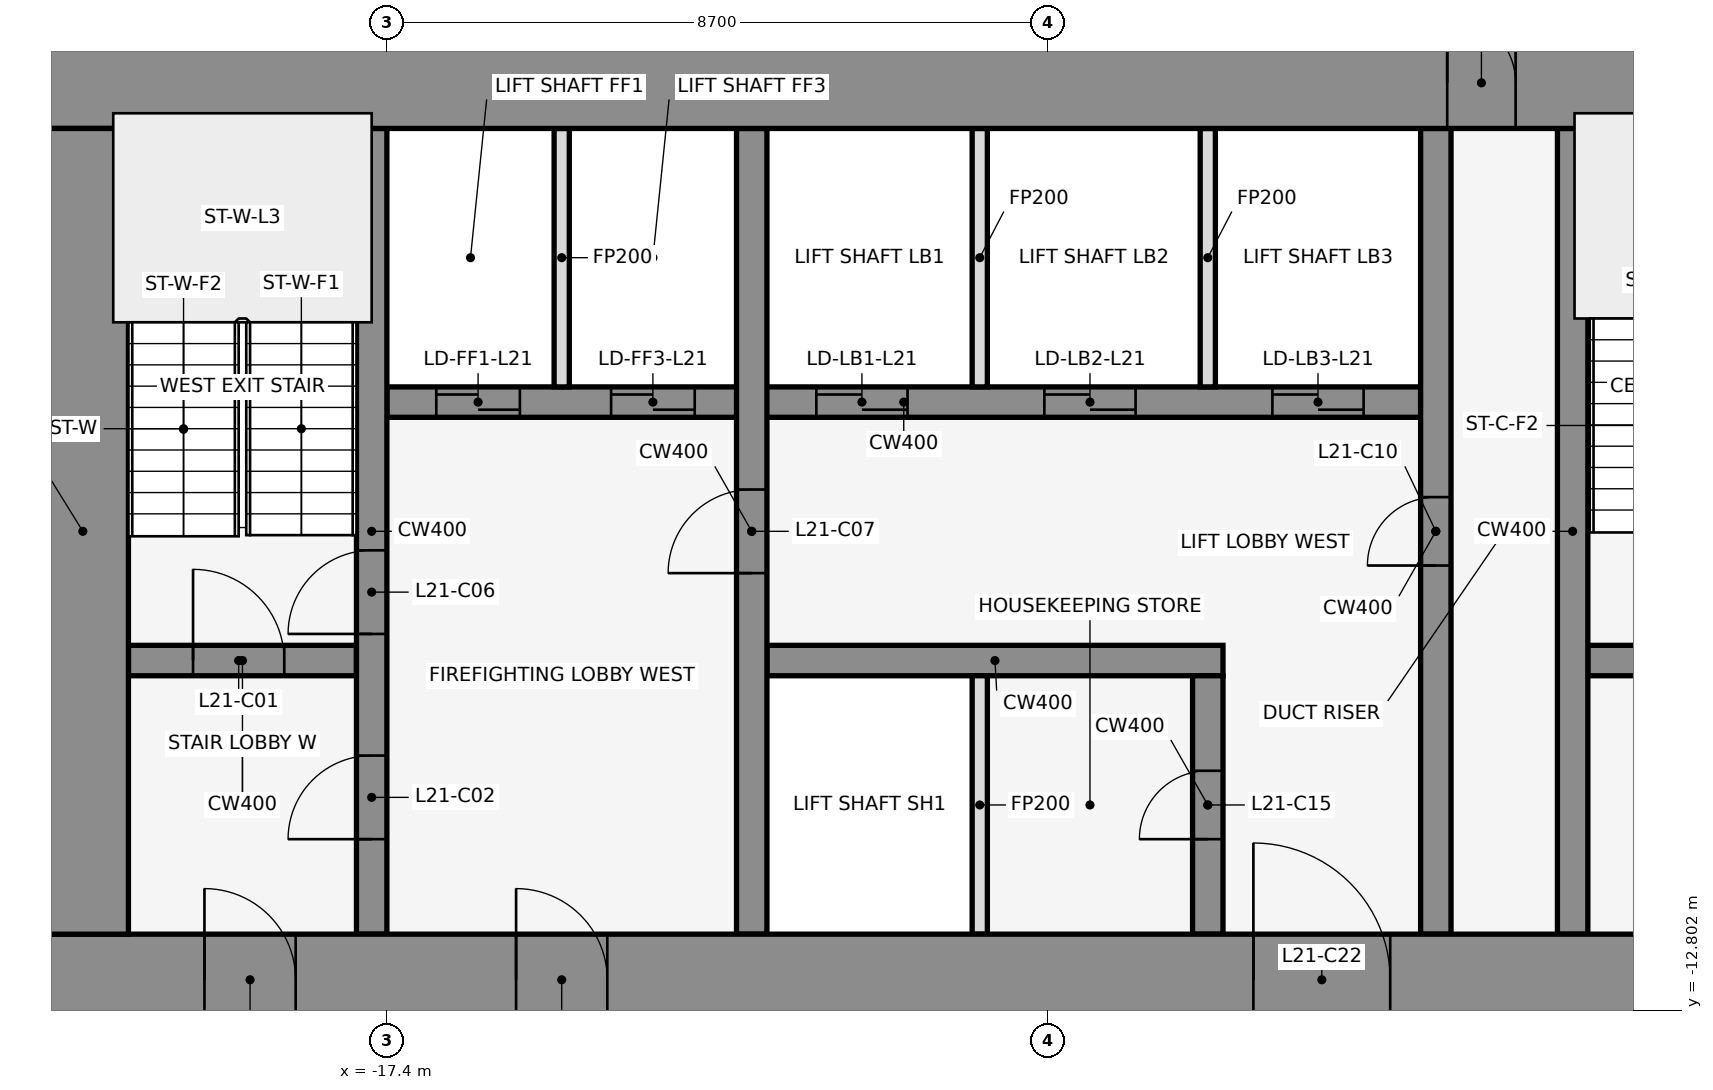
"""IFC4 building model, lengths in metres.
Left out: names, types, materials, properties, quantities, classifications, styles, units other than length and angle.
Written with IfcOpenShell. Run it as: python <this file> out.ifc"""

import sys

from ifc_helpers import new_model, si_unit, direction, frame, frame_2d, origin, place, context, subcontext, project, spatial, rectangle, extrude, element, fill, save


model = new_model("IFC4")
c1 = context("Model", 3, precision=1e-05, world=origin(), true_north=direction((0.0, 1.0)))
c2 = subcontext(c1, "Body", "Model", "MODEL_VIEW")
j1 = project(units=[si_unit("LENGTHUNIT", "METRE"), si_unit("PLANEANGLEUNIT", "RADIAN")], contexts=[c1])
p1 = place(None, origin())
s1 = spatial("IfcSite", under=j1, at=p1, CompositionType="ELEMENT")
p2 = place(p1, origin())
s2 = spatial("IfcBuilding", under=s1, at=p2, CompositionType="ELEMENT")
p3 = place(p2, frame((0.0, 0.0, 102.2)))
s3 = spatial("IfcBuildingStorey", under=s2, at=p3, CompositionType="ELEMENT", Elevation=102.2)
for number, where, z_axis, x_axis in (
    (1, (-0.068, -0.105, 0.0), (0.0, 0.0, 1.0), (-0.84, 0.543, 0.0)),
    (2, (-14.599, 1.08, 0.0), (0.0, 0.0, 1.0), (-0.84, -0.543, 0.0)),
):
    element("IfcWall", number, at=place(p3, frame(where, z_axis=z_axis, x_axis=x_axis)), inside=s3, PredefinedType="STANDARD", context=c2, shape_type="SweptSolid", body=[
        extrude(rectangle(XDim=2.183, YDim=0.25, at=frame_2d((1.091, 0.0))), origin(), (0.0, 0.0, 1.0), 3.95),
    ])
p4 = place(p3, frame((-20.8, -8.2, 0.0), z_axis=(0.0, 0.0, 1.0), x_axis=(1.0, 0.0, 0.0)))
e3 = element("IfcWall", 3, at=p4, inside=s3, PredefinedType="SHEAR", context=c2, shape_type="SweptSolid", body=[
    extrude(rectangle(XDim=3.0, YDim=0.4, at=frame_2d((1.5, 0.0))), origin(), (0.0, 0.0, 1.0), 4.1),
])
p5 = place(p4, frame((0.85, 0.0, 0.0)))
e4 = element("IfcOpeningElement", 4, at=p5, cuts=e3, PredefinedType="OPENING", context=c2, shape_type="SweptSolid", body=[
    extrude(rectangle(XDim=1.2, YDim=2.1, at=frame_2d((0.6, 1.05))), frame((0.0, 0.212, 0.0), z_axis=(0.0, -1.0, 0.0), x_axis=(1.0, 0.0, 0.0)), (0.0, 0.0, 1.0), 0.424),
])
p6 = place(p3, frame((-12.4, -8.2, 0.0), z_axis=(0.0, 0.0, 1.0), x_axis=(1.0, 0.0, 0.0)))
e5 = element("IfcWall", 5, at=p6, inside=s3, PredefinedType="SHEAR", context=c2, shape_type="SweptSolid", body=[
    extrude(rectangle(XDim=6.0, YDim=0.4, at=frame_2d((3.0, 0.0))), origin(), (0.0, 0.0, 1.0), 4.1),
])
p7 = place(p3, frame((-1.6, -8.2, 0.0), z_axis=(0.0, 0.0, 1.0), x_axis=(1.0, 0.0, 0.0)))
e6 = element("IfcWall", 6, at=p7, inside=s3, PredefinedType="SHEAR", context=c2, shape_type="SweptSolid", body=[
    extrude(rectangle(XDim=3.2, YDim=0.4, at=frame_2d((1.6, 0.0))), origin(), (0.0, 0.0, 1.0), 4.1),
])
p8 = place(p7, frame((1.05, 0.0, 0.0)))
e7 = element("IfcOpeningElement", 7, at=p8, cuts=e6, PredefinedType="OPENING", context=c2, shape_type="SweptSolid", body=[
    extrude(rectangle(XDim=1.2, YDim=2.1, at=frame_2d((0.6, 1.05))), frame((0.0, 0.212, 0.0), z_axis=(0.0, -1.0, 0.0), x_axis=(1.0, 0.0, 0.0)), (0.0, 0.0, 1.0), 0.424),
])
p9 = place(p3, frame((-17.4, -4.8, 0.0), z_axis=(0.0, 0.0, 1.0), x_axis=(1.0, 0.0, 0.0)))
e8 = element("IfcWall", 8, at=p9, inside=s3, PredefinedType="SHEAR", context=c2, shape_type="SweptSolid", body=[
    extrude(rectangle(XDim=13.6, YDim=0.4, at=frame_2d((6.8, 0.0))), origin(), (0.0, 0.0, 1.0), 4.1),
])
p10 = place(p9, frame((0.65, 0.0, 0.0)))
e9 = element("IfcOpeningElement", 9, at=p10, cuts=e8, PredefinedType="OPENING", context=c2, shape_type="SweptSolid", body=[
    extrude(rectangle(XDim=1.1, YDim=2.1, at=frame_2d((0.55, 1.05))), frame((0.0, 0.212, 0.0), z_axis=(0.0, -1.0, 0.0), x_axis=(1.0, 0.0, 0.0)), (0.0, 0.0, 1.0), 0.424),
])
p11 = place(p9, frame((2.95, 0.0, 0.0)))
e10 = element("IfcOpeningElement", 10, at=p11, cuts=e8, PredefinedType="OPENING", context=c2, shape_type="SweptSolid", body=[
    extrude(rectangle(XDim=1.1, YDim=2.1, at=frame_2d((0.55, 1.05))), frame((0.0, 0.212, 0.0), z_axis=(0.0, -1.0, 0.0), x_axis=(1.0, 0.0, 0.0)), (0.0, 0.0, 1.0), 0.424),
])
p12 = place(p9, frame((5.65, 0.0, 0.0)))
e11 = element("IfcOpeningElement", 11, at=p12, cuts=e8, PredefinedType="OPENING", context=c2, shape_type="SweptSolid", body=[
    extrude(rectangle(XDim=1.2, YDim=2.1, at=frame_2d((0.6, 1.05))), frame((0.0, 0.212, 0.0), z_axis=(0.0, -1.0, 0.0), x_axis=(1.0, 0.0, 0.0)), (0.0, 0.0, 1.0), 0.424),
])
p13 = place(p9, frame((8.65, 0.0, 0.0)))
e12 = element("IfcOpeningElement", 12, at=p13, cuts=e8, PredefinedType="OPENING", context=c2, shape_type="SweptSolid", body=[
    extrude(rectangle(XDim=1.2, YDim=2.1, at=frame_2d((0.6, 1.05))), frame((0.0, 0.212, 0.0), z_axis=(0.0, -1.0, 0.0), x_axis=(1.0, 0.0, 0.0)), (0.0, 0.0, 1.0), 0.424),
])
p14 = place(p9, frame((11.65, 0.0, 0.0)))
e13 = element("IfcOpeningElement", 13, at=p14, cuts=e8, PredefinedType="OPENING", context=c2, shape_type="SweptSolid", body=[
    extrude(rectangle(XDim=1.2, YDim=2.1, at=frame_2d((0.6, 1.05))), frame((0.0, 0.212, 0.0), z_axis=(0.0, -1.0, 0.0), x_axis=(1.0, 0.0, 0.0)), (0.0, 0.0, 1.0), 0.424),
])
p15 = place(p3, frame((-17.6, -11.8, 0.0), z_axis=(0.0, 0.0, 1.0), x_axis=(0.0, 1.0, 0.0)))
e14 = element("IfcWall", 14, at=p15, inside=s3, PredefinedType="SHEAR", context=c2, shape_type="SweptSolid", body=[
    extrude(rectangle(XDim=10.6, YDim=0.4, at=frame_2d((5.3, 0.0))), origin(), (0.0, 0.0, 1.0), 4.1),
])
p16 = place(p15, frame((1.25, 0.0, 0.0)))
e15 = element("IfcOpeningElement", 15, at=p16, cuts=e14, PredefinedType="OPENING", context=c2, shape_type="SweptSolid", body=[
    extrude(rectangle(XDim=1.1, YDim=2.1, at=frame_2d((0.55, 1.05))), frame((0.0, 0.212, 0.0), z_axis=(0.0, -1.0, 0.0), x_axis=(1.0, 0.0, 0.0)), (0.0, 0.0, 1.0), 0.424),
])
p17 = place(p15, frame((3.95, 0.0, 0.0)))
e16 = element("IfcOpeningElement", 16, at=p17, cuts=e14, PredefinedType="OPENING", context=c2, shape_type="SweptSolid", body=[
    extrude(rectangle(XDim=1.1, YDim=2.1, at=frame_2d((0.55, 1.05))), frame((0.0, 0.212, 0.0), z_axis=(0.0, -1.0, 0.0), x_axis=(1.0, 0.0, 0.0)), (0.0, 0.0, 1.0), 0.424),
])
p18 = place(p3, frame((-15.1, -4.6, 0.0), z_axis=(0.0, 0.0, 1.0), x_axis=(0.0, 1.0, 0.0)))
e17 = element("IfcWall", 17, at=p18, inside=s3, PredefinedType="PARTITIONING", context=c2, shape_type="SweptSolid", body=[
    extrude(rectangle(XDim=3.4, YDim=0.2, at=frame_2d((1.7, 0.0))), origin(), (0.0, 0.0, 1.0), 3.018),
])
p19 = place(p3, frame((-12.6, -11.8, 0.0), z_axis=(0.0, 0.0, 1.0), x_axis=(0.0, 1.0, 0.0)))
e18 = element("IfcWall", 18, at=p19, inside=s3, PredefinedType="SHEAR", context=c2, shape_type="SweptSolid", body=[
    extrude(rectangle(XDim=10.6, YDim=0.4, at=frame_2d((5.3, 0.0))), origin(), (0.0, 0.0, 1.0), 4.1),
])
p20 = place(p19, frame((4.75, 0.0, 0.0)))
e19 = element("IfcOpeningElement", 19, at=p20, cuts=e18, PredefinedType="OPENING", context=c2, shape_type="SweptSolid", body=[
    extrude(rectangle(XDim=1.1, YDim=2.1, at=frame_2d((0.55, 1.05))), frame((0.0, 0.212, 0.0), z_axis=(0.0, -1.0, 0.0), x_axis=(1.0, 0.0, 0.0)), (0.0, 0.0, 1.0), 0.424),
])
for number, where, z_axis, x_axis in (
    (20, (-9.6, -11.8, 0.0), (0.0, 0.0, 1.0), (0.0, 1.0, 0.0)),
    (21, (-9.6, -4.6, 0.0), (0.0, 0.0, 1.0), (0.0, 1.0, 0.0)),
):
    element("IfcWall", number, at=place(p3, frame(where, z_axis=z_axis, x_axis=x_axis)), inside=s3, PredefinedType="PARTITIONING", context=c2, shape_type="SweptSolid", body=[
        extrude(rectangle(XDim=3.4, YDim=0.2, at=frame_2d((1.7, 0.0))), origin(), (0.0, 0.0, 1.0), 3.018),
    ])
p21 = place(p3, frame((-6.6, -11.8, 0.0), z_axis=(0.0, 0.0, 1.0), x_axis=(0.0, 1.0, 0.0)))
e22 = element("IfcWall", 22, at=p21, inside=s3, PredefinedType="SHEAR", context=c2, shape_type="SweptSolid", body=[
    extrude(rectangle(XDim=3.4, YDim=0.4, at=frame_2d((1.7, 0.0))), origin(), (0.0, 0.0, 1.0), 4.1),
])
p22 = place(p21, frame((1.25, 0.0, 0.0)))
e23 = element("IfcOpeningElement", 23, at=p22, cuts=e22, PredefinedType="OPENING", context=c2, shape_type="SweptSolid", body=[
    extrude(rectangle(XDim=0.9, YDim=2.1, at=frame_2d((0.45, 1.05))), frame((0.0, 0.212, 0.0), z_axis=(0.0, -1.0, 0.0), x_axis=(1.0, 0.0, 0.0)), (0.0, 0.0, 1.0), 0.424),
])
p23 = place(p3, frame((-6.6, -4.6, 0.0), z_axis=(0.0, 0.0, 1.0), x_axis=(0.0, 1.0, 0.0)))
e24 = element("IfcWall", 24, at=p23, inside=s3, PredefinedType="PARTITIONING", context=c2, shape_type="SweptSolid", body=[
    extrude(rectangle(XDim=3.4, YDim=0.2, at=frame_2d((1.7, 0.0))), origin(), (0.0, 0.0, 1.0), 3.018),
])
p24 = place(p3, frame((-3.6, -11.8, 0.0), z_axis=(0.0, 0.0, 1.0), x_axis=(0.0, 1.0, 0.0)))
e25 = element("IfcWall", 25, at=p24, inside=s3, PredefinedType="SHEAR", context=c2, shape_type="SweptSolid", body=[
    extrude(rectangle(XDim=10.6, YDim=0.4, at=frame_2d((5.3, 0.0))), origin(), (0.0, 0.0, 1.0), 4.1),
])
p25 = place(p24, frame((4.85, 0.0, 0.0)))
e26 = element("IfcOpeningElement", 26, at=p25, cuts=e25, PredefinedType="OPENING", context=c2, shape_type="SweptSolid", body=[
    extrude(rectangle(XDim=0.9, YDim=2.1, at=frame_2d((0.45, 1.05))), frame((0.0, 0.212, 0.0), z_axis=(0.0, -1.0, 0.0), x_axis=(1.0, 0.0, 0.0)), (0.0, 0.0, 1.0), 0.424),
])
p26 = place(p3, frame((-1.8, -11.8, 0.0), z_axis=(0.0, 0.0, 1.0), x_axis=(0.0, 1.0, 0.0)))
e27 = element("IfcWall", 27, at=p26, inside=s3, PredefinedType="SHEAR", context=c2, shape_type="SweptSolid", body=[
    extrude(rectangle(XDim=10.6, YDim=0.4, at=frame_2d((5.3, 0.0))), origin(), (0.0, 0.0, 1.0), 4.1),
])
p27 = place(p3, frame((-22.0, -0.6, 0.0), z_axis=(0.0, 0.0, 1.0), x_axis=(1.0, 0.0, 0.0)))
e28 = element("IfcWall", 28, at=p27, inside=s3, PredefinedType="SHEAR", context=c2, shape_type="SweptSolid", body=[
    extrude(rectangle(XDim=44.0, YDim=1.2, at=frame_2d((22.0, 0.0))), origin(), (0.0, 0.0, 1.0), 4.1),
])
p28 = place(p27, frame((18.55, 0.0, 0.0)))
e29 = element("IfcOpeningElement", 29, at=p28, cuts=e28, PredefinedType="OPENING", context=c2, shape_type="SweptSolid", body=[
    extrude(rectangle(XDim=0.9, YDim=2.1, at=frame_2d((0.45, 1.05))), frame((0.0, 0.612, 0.0), z_axis=(0.0, -1.0, 0.0), x_axis=(1.0, 0.0, 0.0)), (0.0, 0.0, 1.0), 1.224),
])
p29 = place(p27, frame((24.55, 0.0, 0.0)))
e30 = element("IfcOpeningElement", 30, at=p29, cuts=e28, PredefinedType="OPENING", context=c2, shape_type="SweptSolid", body=[
    extrude(rectangle(XDim=0.9, YDim=2.1, at=frame_2d((0.45, 1.05))), frame((0.0, 0.612, 0.0), z_axis=(0.0, -1.0, 0.0), x_axis=(1.0, 0.0, 0.0)), (0.0, 0.0, 1.0), 1.224),
])
p30 = place(p3, frame((-22.0, -12.4, 0.0), z_axis=(0.0, 0.0, 1.0), x_axis=(1.0, 0.0, 0.0)))
e31 = element("IfcWall", 31, at=p30, inside=s3, PredefinedType="SHEAR", context=c2, shape_type="SweptSolid", body=[
    extrude(rectangle(XDim=44.0, YDim=1.2, at=frame_2d((22.0, 0.0))), origin(), (0.0, 0.0, 1.0), 4.1),
])
p31 = place(p30, frame((2.2, 0.0, 0.0)))
e32 = element("IfcOpeningElement", 32, at=p31, cuts=e31, PredefinedType="OPENING", context=c2, shape_type="SweptSolid", body=[
    extrude(rectangle(XDim=1.2, YDim=2.1, at=frame_2d((0.6, 1.05))), frame((0.0, 0.612, 0.0), z_axis=(0.0, -1.0, 0.0), x_axis=(1.0, 0.0, 0.0)), (0.0, 0.0, 1.0), 1.224),
])
p32 = place(p30, frame((21.4, 0.0, 0.0)))
e33 = element("IfcOpeningElement", 33, at=p32, cuts=e31, PredefinedType="OPENING", context=c2, shape_type="SweptSolid", body=[
    extrude(rectangle(XDim=1.2, YDim=2.1, at=frame_2d((0.6, 1.05))), frame((0.0, 0.612, 0.0), z_axis=(0.0, -1.0, 0.0), x_axis=(1.0, 0.0, 0.0)), (0.0, 0.0, 1.0), 1.224),
])
p33 = place(p30, frame((40.6, 0.0, 0.0)))
e34 = element("IfcOpeningElement", 34, at=p33, cuts=e31, PredefinedType="OPENING", context=c2, shape_type="SweptSolid", body=[
    extrude(rectangle(XDim=1.2, YDim=2.1, at=frame_2d((0.6, 1.05))), frame((0.0, 0.612, 0.0), z_axis=(0.0, -1.0, 0.0), x_axis=(1.0, 0.0, 0.0)), (0.0, 0.0, 1.0), 1.224),
])
p34 = place(p30, frame((16.0, 0.0, 0.0)))
e35 = element("IfcOpeningElement", 35, at=p34, cuts=e31, PredefinedType="OPENING", context=c2, shape_type="SweptSolid", body=[
    extrude(rectangle(XDim=1.8, YDim=2.1, at=frame_2d((0.9, 1.05))), frame((0.0, 0.612, 0.0), z_axis=(0.0, -1.0, 0.0), x_axis=(1.0, 0.0, 0.0)), (0.0, 0.0, 1.0), 1.224),
])
p35 = place(p30, frame((6.3, 0.0, 0.0)))
e36 = element("IfcOpeningElement", 36, at=p35, cuts=e31, PredefinedType="OPENING", context=c2, shape_type="SweptSolid", body=[
    extrude(rectangle(XDim=1.2, YDim=2.1, at=frame_2d((0.6, 1.05))), frame((0.0, 0.612, 0.0), z_axis=(0.0, -1.0, 0.0), x_axis=(1.0, 0.0, 0.0)), (0.0, 0.0, 1.0), 1.224),
])
p36 = place(p30, frame((26.2, 0.0, 0.0)))
e37 = element("IfcOpeningElement", 37, at=p36, cuts=e31, PredefinedType="OPENING", context=c2, shape_type="SweptSolid", body=[
    extrude(rectangle(XDim=1.8, YDim=2.1, at=frame_2d((0.9, 1.05))), frame((0.0, 0.612, 0.0), z_axis=(0.0, -1.0, 0.0), x_axis=(1.0, 0.0, 0.0)), (0.0, 0.0, 1.0), 1.224),
])
p37 = place(p30, frame((36.5, 0.0, 0.0)))
e38 = element("IfcOpeningElement", 38, at=p37, cuts=e31, PredefinedType="OPENING", context=c2, shape_type="SweptSolid", body=[
    extrude(rectangle(XDim=1.2, YDim=2.1, at=frame_2d((0.6, 1.05))), frame((0.0, 0.612, 0.0), z_axis=(0.0, -1.0, 0.0), x_axis=(1.0, 0.0, 0.0)), (0.0, 0.0, 1.0), 1.224),
])
p38 = place(p3, frame((-21.4, -11.8, 0.0), z_axis=(0.0, 0.0, 1.0), x_axis=(0.0, 1.0, 0.0)))
e39 = element("IfcWall", 39, at=p38, inside=s3, PredefinedType="SHEAR", context=c2, shape_type="SweptSolid", body=[
    extrude(rectangle(XDim=10.6, YDim=1.2, at=frame_2d((5.3, 0.0))), origin(), (0.0, 0.0, 1.0), 4.1),
])
p39 = place(p5, origin())
e40 = element("IfcDoor", 40, at=p39, inside=s3, OperationType="SINGLE_SWING_LEFT", PredefinedType="DOOR", context=c2, shape_type="SweptSolid", body=[
    extrude(rectangle(XDim=1.2, YDim=2.1, at=frame_2d((0.6, 1.05))), frame((0.0, 0.025, 0.0), z_axis=(0.0, -1.0, 0.0), x_axis=(1.0, 0.0, 0.0)), (0.0, 0.0, 1.0), 0.05),
])
fill(e4, e40)
p40 = place(p16, frame((1.1, 0.0, 0.0), z_axis=(0.0, 0.0, 1.0), x_axis=(-1.0, 0.0, 0.0)))
e41 = element("IfcDoor", 41, at=p40, inside=s3, OperationType="SINGLE_SWING_LEFT", PredefinedType="DOOR", context=c2, shape_type="SweptSolid", body=[
    extrude(rectangle(XDim=1.1, YDim=2.1, at=frame_2d((0.55, 1.05))), frame((0.0, 0.025, 0.0), z_axis=(0.0, -1.0, 0.0), x_axis=(1.0, 0.0, 0.0)), (0.0, 0.0, 1.0), 0.05),
])
fill(e15, e41)
p41 = place(p10, origin())
e42 = element("IfcDoor", 42, at=p41, inside=s3, OperationType="DOUBLE_DOOR_SLIDING", PredefinedType="DOOR", context=c2, shape_type="SweptSolid", body=[
    extrude(rectangle(XDim=1.1, YDim=2.1, at=frame_2d((0.55, 1.05))), frame((0.0, 0.025, 0.0), z_axis=(0.0, -1.0, 0.0), x_axis=(1.0, 0.0, 0.0)), (0.0, 0.0, 1.0), 0.05),
])
fill(e9, e42)
p42 = place(p11, origin())
e43 = element("IfcDoor", 43, at=p42, inside=s3, OperationType="DOUBLE_DOOR_SLIDING", PredefinedType="DOOR", context=c2, shape_type="SweptSolid", body=[
    extrude(rectangle(XDim=1.1, YDim=2.1, at=frame_2d((0.55, 1.05))), frame((0.0, 0.025, 0.0), z_axis=(0.0, -1.0, 0.0), x_axis=(1.0, 0.0, 0.0)), (0.0, 0.0, 1.0), 0.05),
])
fill(e10, e43)
p43 = place(p12, origin())
e44 = element("IfcDoor", 44, at=p43, inside=s3, OperationType="DOUBLE_DOOR_SLIDING", PredefinedType="DOOR", context=c2, shape_type="SweptSolid", body=[
    extrude(rectangle(XDim=1.2, YDim=2.1, at=frame_2d((0.6, 1.05))), frame((0.0, 0.025, 0.0), z_axis=(0.0, -1.0, 0.0), x_axis=(1.0, 0.0, 0.0)), (0.0, 0.0, 1.0), 0.05),
])
fill(e11, e44)
p44 = place(p13, origin())
e45 = element("IfcDoor", 45, at=p44, inside=s3, OperationType="DOUBLE_DOOR_SLIDING", PredefinedType="DOOR", context=c2, shape_type="SweptSolid", body=[
    extrude(rectangle(XDim=1.2, YDim=2.1, at=frame_2d((0.6, 1.05))), frame((0.0, 0.025, 0.0), z_axis=(0.0, -1.0, 0.0), x_axis=(1.0, 0.0, 0.0)), (0.0, 0.0, 1.0), 0.05),
])
fill(e12, e45)
p45 = place(p14, origin())
e46 = element("IfcDoor", 46, at=p45, inside=s3, OperationType="DOUBLE_DOOR_SLIDING", PredefinedType="DOOR", context=c2, shape_type="SweptSolid", body=[
    extrude(rectangle(XDim=1.2, YDim=2.1, at=frame_2d((0.6, 1.05))), frame((0.0, 0.025, 0.0), z_axis=(0.0, -1.0, 0.0), x_axis=(1.0, 0.0, 0.0)), (0.0, 0.0, 1.0), 0.05),
])
fill(e13, e46)
p46 = place(p17, frame((1.1, 0.0, 0.0), z_axis=(0.0, 0.0, 1.0), x_axis=(-1.0, 0.0, 0.0)))
e47 = element("IfcDoor", 47, at=p46, inside=s3, OperationType="SINGLE_SWING_LEFT", PredefinedType="DOOR", context=c2, shape_type="SweptSolid", body=[
    extrude(rectangle(XDim=1.1, YDim=2.1, at=frame_2d((0.55, 1.05))), frame((0.0, 0.025, 0.0), z_axis=(0.0, -1.0, 0.0), x_axis=(1.0, 0.0, 0.0)), (0.0, 0.0, 1.0), 0.05),
])
fill(e16, e47)
p47 = place(p20, origin())
e48 = element("IfcDoor", 48, at=p47, inside=s3, OperationType="SINGLE_SWING_LEFT", PredefinedType="DOOR", context=c2, shape_type="SweptSolid", body=[
    extrude(rectangle(XDim=1.1, YDim=2.1, at=frame_2d((0.55, 1.05))), frame((0.0, 0.025, 0.0), z_axis=(0.0, -1.0, 0.0), x_axis=(1.0, 0.0, 0.0)), (0.0, 0.0, 1.0), 0.05),
])
fill(e19, e48)
p48 = place(p25, frame((0.9, 0.0, 0.0), z_axis=(0.0, 0.0, 1.0), x_axis=(-1.0, 0.0, 0.0)))
e49 = element("IfcDoor", 49, at=p48, inside=s3, OperationType="SINGLE_SWING_LEFT", PredefinedType="DOOR", context=c2, shape_type="SweptSolid", body=[
    extrude(rectangle(XDim=0.9, YDim=2.1, at=frame_2d((0.45, 1.05))), frame((0.0, 0.025, 0.0), z_axis=(0.0, -1.0, 0.0), x_axis=(1.0, 0.0, 0.0)), (0.0, 0.0, 1.0), 0.05),
])
fill(e26, e49)
p49 = place(p22, origin())
e50 = element("IfcDoor", 50, at=p49, inside=s3, OperationType="SINGLE_SWING_LEFT", PredefinedType="DOOR", context=c2, shape_type="SweptSolid", body=[
    extrude(rectangle(XDim=0.9, YDim=2.1, at=frame_2d((0.45, 1.05))), frame((0.0, 0.025, 0.0), z_axis=(0.0, -1.0, 0.0), x_axis=(1.0, 0.0, 0.0)), (0.0, 0.0, 1.0), 0.05),
])
fill(e23, e50)
p50 = place(p28, origin())
e51 = element("IfcDoor", 51, at=p50, inside=s3, OperationType="SINGLE_SWING_LEFT", PredefinedType="DOOR", context=c2, shape_type="SweptSolid", body=[
    extrude(rectangle(XDim=0.9, YDim=2.1, at=frame_2d((0.45, 1.05))), frame((0.0, 0.025, 0.0), z_axis=(0.0, -1.0, 0.0), x_axis=(1.0, 0.0, 0.0)), (0.0, 0.0, 1.0), 0.05),
])
fill(e29, e51)
p51 = place(p31, frame((1.2, 0.0, 0.0), z_axis=(0.0, 0.0, 1.0), x_axis=(-1.0, 0.0, 0.0)))
e52 = element("IfcDoor", 52, at=p51, inside=s3, OperationType="SINGLE_SWING_RIGHT", PredefinedType="DOOR", context=c2, shape_type="SweptSolid", body=[
    extrude(rectangle(XDim=1.2, YDim=2.1, at=frame_2d((0.6, 1.05))), frame((0.0, 0.025, 0.0), z_axis=(0.0, -1.0, 0.0), x_axis=(1.0, 0.0, 0.0)), (0.0, 0.0, 1.0), 0.05),
])
fill(e32, e52)
p52 = place(p34, origin())
e53 = element("IfcDoor", 53, at=p52, inside=s3, OperationType="SINGLE_SWING_LEFT", PredefinedType="DOOR", context=c2, shape_type="SweptSolid", body=[
    extrude(rectangle(XDim=1.8, YDim=2.1, at=frame_2d((0.9, 1.05))), frame((0.0, 0.025, 0.0), z_axis=(0.0, -1.0, 0.0), x_axis=(1.0, 0.0, 0.0)), (0.0, 0.0, 1.0), 0.05),
])
fill(e35, e53)
p53 = place(p35, frame((1.2, 0.0, 0.0), z_axis=(0.0, 0.0, 1.0), x_axis=(-1.0, 0.0, 0.0)))
e54 = element("IfcDoor", 54, at=p53, inside=s3, OperationType="SINGLE_SWING_RIGHT", PredefinedType="DOOR", context=c2, shape_type="SweptSolid", body=[
    extrude(rectangle(XDim=1.2, YDim=2.1, at=frame_2d((0.6, 1.05))), frame((0.0, 0.025, 0.0), z_axis=(0.0, -1.0, 0.0), x_axis=(1.0, 0.0, 0.0)), (0.0, 0.0, 1.0), 0.05),
])
fill(e36, e54)
save(model, sys.argv[1])
